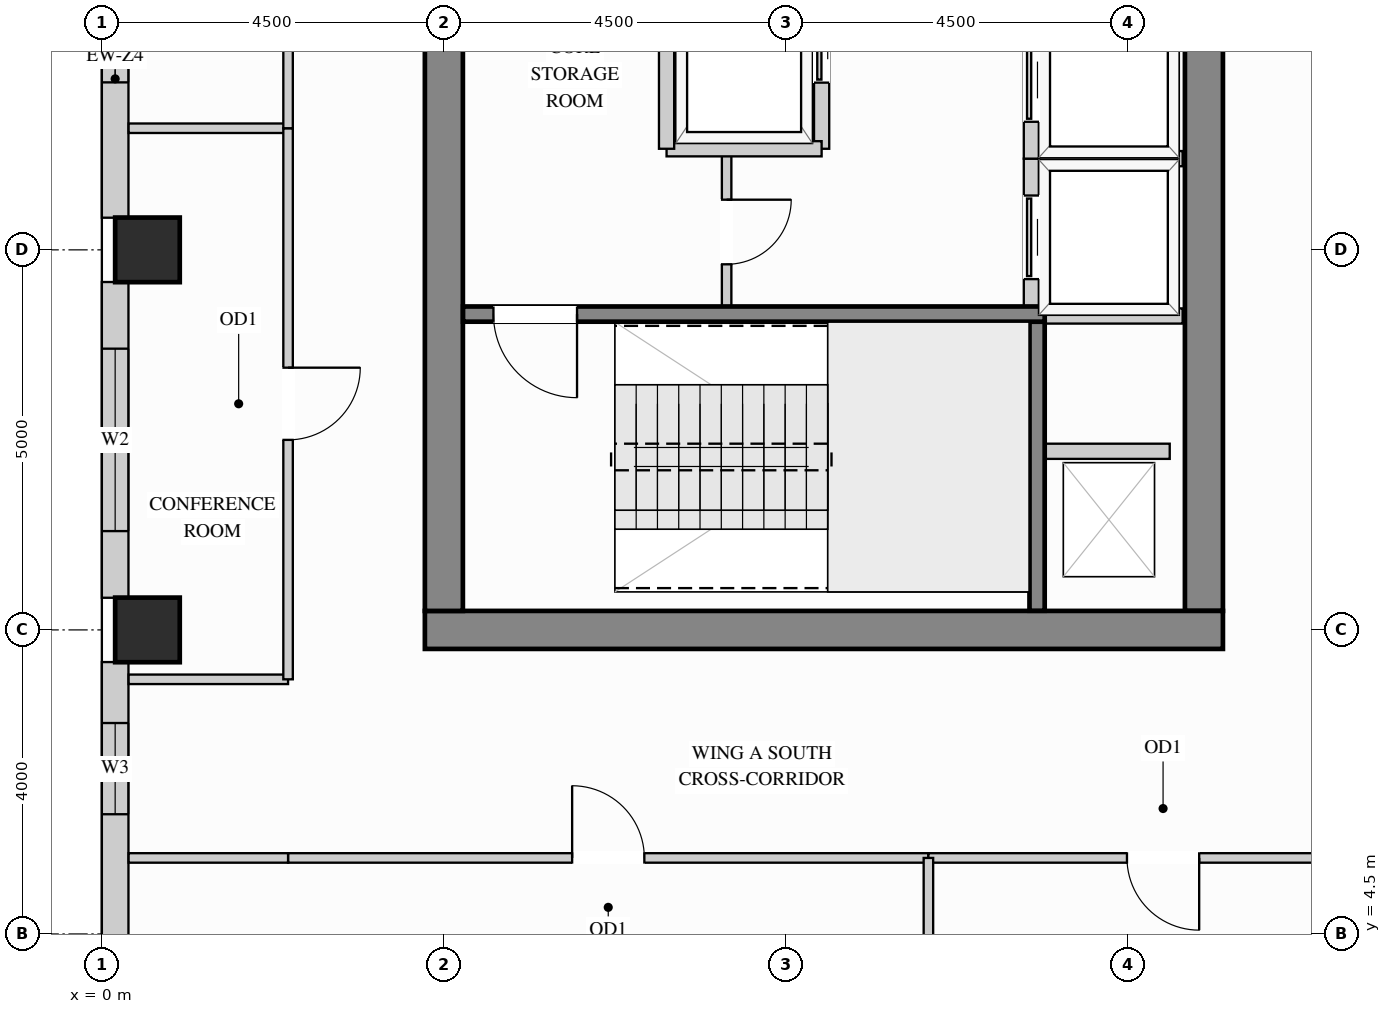
"""IFC4 building model, lengths in metres.
Left out: names, types, materials, properties, quantities, classifications, styles, units other than length and angle.
Written with IfcOpenShell. Run it as: python <this file> out.ifc"""

import sys

from ifc_helpers import new_model, si_unit, direction, frame, frame_2d, origin, origin_2d, place, context, subcontext, project, spatial, rectangle, extrude, source, transform, mapped, element, fill, save


model = new_model("IFC4")
c1 = context("Model", 3, precision=1e-05, world=origin(), true_north=direction((0.0, 1.0)))
c2 = subcontext(c1, "Body", "Model", "MODEL_VIEW")
j1 = project(units=[si_unit("LENGTHUNIT", "METRE"), si_unit("PLANEANGLEUNIT", "RADIAN")], contexts=[c1])
p1 = place(None, origin())
s1 = spatial("IfcSite", under=j1, at=p1, CompositionType="ELEMENT")
p2 = place(p1, origin())
s2 = spatial("IfcBuilding", under=s1, at=p2, CompositionType="ELEMENT")
p3 = place(p2, frame((0.0, 0.0, 216.0)))
s3 = spatial("IfcBuildingStorey", under=s2, at=p3, CompositionType="ELEMENT", Elevation=216.0)
m1 = source(origin(), c2, "Body", "SweptSolid", [
    extrude(rectangle(XDim=0.85, YDim=0.85, at=origin_2d()), origin(), (0.0, 0.0, 1.0), 3.4),
])
for number, where, z_axis, x_axis in (
    (1, (0.6, 13.5, 0.0), (0.0, 0.0, 1.0), (1.0, 0.0, 0.0)),
    (2, (0.6, 8.5, 0.0), (0.0, 0.0, 1.0), (1.0, 0.0, 0.0)),
):
    element("IfcColumn", number, at=place(p3, frame(where, z_axis=z_axis, x_axis=x_axis)), inside=s3, PredefinedType="COLUMN", context=c2, shape_type="MappedRepresentation", body=[
        mapped(m1, transform((0.0, 0.0, 0.0), x_axis=(1.0, 0.0, 0.0), y_axis=(0.0, 1.0, 0.0), z_axis=(0.0, 0.0, 1.0))),
    ])
m2 = source(origin(), c2, "Body", "SweptSolid", [
    extrude(rectangle(XDim=10.07, YDim=0.5, at=frame_2d((5.035, 0.0))), origin(), (0.0, 0.0, 1.0), 3.4),
])
p4 = place(p3, frame((14.5, 8.75, 0.0), z_axis=(0.0, 0.0, 1.0), x_axis=(0.0, 1.0, 0.0)))
e3 = element("IfcWall", 3, at=p4, inside=s3, PredefinedType="SHEAR", context=c2, shape_type="MappedRepresentation", body=[
    mapped(m2, transform((0.0, 0.0, 0.0), x_axis=(1.0, 0.0, 0.0), y_axis=(0.0, 1.0, 0.0), z_axis=(0.0, 0.0, 1.0))),
])
m3 = source(origin(), c2, "Body", "SweptSolid", [
    extrude(rectangle(XDim=10.5, YDim=0.5, at=frame_2d((5.25, 0.0))), origin(), (0.0, 0.0, 1.0), 3.4),
])
p5 = place(p3, frame((4.25, 8.5, 0.0), z_axis=(0.0, 0.0, 1.0), x_axis=(1.0, 0.0, 0.0)))
e4 = element("IfcWall", 4, at=p5, inside=s3, PredefinedType="SHEAR", context=c2, shape_type="MappedRepresentation", body=[
    mapped(m3, transform((0.0, 0.0, 0.0), x_axis=(1.0, 0.0, 0.0), y_axis=(0.0, 1.0, 0.0), z_axis=(0.0, 0.0, 1.0))),
])
m4 = source(origin(), c2, "Body", "SweptSolid", [
    extrude(rectangle(XDim=20.5, YDim=0.5, at=frame_2d((10.25, 0.0))), origin(), (0.0, 0.0, 1.0), 3.4),
])
p6 = place(p3, frame((4.5, 8.75, 0.0), z_axis=(0.0, 0.0, 1.0), x_axis=(0.0, 1.0, 0.0)))
e5 = element("IfcWall", 5, at=p6, inside=s3, PredefinedType="SHEAR", context=c2, shape_type="MappedRepresentation", body=[
    mapped(m4, transform((0.0, 0.0, 0.0), x_axis=(1.0, 0.0, 0.0), y_axis=(0.0, 1.0, 0.0), z_axis=(0.0, 0.0, 1.0))),
])
p7 = place(p3, frame((0.175, 17.577, 0.0), z_axis=(0.0, 0.0, 1.0), x_axis=(0.0, -1.0, 0.0)))
e6 = element("IfcWall", 6, at=p7, inside=s3, PredefinedType="SOLIDWALL", context=c2, shape_type="SweptSolid", body=[
    extrude(rectangle(XDim=3.654, YDim=0.35, at=frame_2d((1.827, 0.0))), origin(), (0.0, 0.0, 1.0), 3.385),
])
p8 = place(p7, frame((0.674, 0.0, 0.78)))
e7 = element("IfcOpeningElement", 7, at=p8, cuts=e6, PredefinedType="OPENING", context=c2, shape_type="SweptSolid", body=[
    extrude(rectangle(XDim=1.2, YDim=2.1, at=frame_2d((0.6, 1.05))), frame((0.0, 0.185, 0.0), z_axis=(0.0, -1.0, 0.0), x_axis=(1.0, 0.0, 0.0)), (0.0, 0.0, 1.0), 0.37),
])
p9 = place(p3, frame((0.175, 13.077, 0.0), z_axis=(0.0, 0.0, 1.0), x_axis=(0.0, -1.0, 0.0)))
e8 = element("IfcWall", 8, at=p9, inside=s3, PredefinedType="SOLIDWALL", context=c2, shape_type="SweptSolid", body=[
    extrude(rectangle(XDim=4.154, YDim=0.35, at=frame_2d((2.077, 0.0))), origin(), (0.0, 0.0, 1.0), 3.385),
])
p10 = place(p9, frame((0.877, 0.0, 0.78)))
e9 = element("IfcOpeningElement", 9, at=p10, cuts=e8, PredefinedType="OPENING", context=c2, shape_type="SweptSolid", body=[
    extrude(rectangle(XDim=2.4, YDim=2.1, at=frame_2d((1.2, 1.05))), frame((0.0, 0.185, 0.0), z_axis=(0.0, -1.0, 0.0), x_axis=(1.0, 0.0, 0.0)), (0.0, 0.0, 1.0), 0.37),
])
p11 = place(p3, frame((0.175, 8.077, 0.0), z_axis=(0.0, 0.0, 1.0), x_axis=(0.0, -1.0, 0.0)))
e10 = element("IfcWall", 10, at=p11, inside=s3, PredefinedType="SOLIDWALL", context=c2, shape_type="SweptSolid", body=[
    extrude(rectangle(XDim=4.154, YDim=0.35, at=frame_2d((2.077, 0.0))), origin(), (0.0, 0.0, 1.0), 3.385),
])
p12 = place(p11, frame((0.802, 0.0, 0.78)))
e11 = element("IfcOpeningElement", 11, at=p12, cuts=e10, PredefinedType="OPENING", context=c2, shape_type="SweptSolid", body=[
    extrude(rectangle(XDim=1.2, YDim=2.1, at=frame_2d((0.6, 1.05))), frame((0.0, 0.185, 0.0), z_axis=(0.0, -1.0, 0.0), x_axis=(1.0, 0.0, 0.0)), (0.0, 0.0, 1.0), 0.37),
])
p13 = place(p3, frame((8.22, 12.75, 0.0), z_axis=(0.0, 0.0, 1.0), x_axis=(0.0, 1.0, 0.0)))
e12 = element("IfcWall", 12, at=p13, inside=s3, PredefinedType="PARTITIONING", context=c2, shape_type="SweptSolid", body=[
    extrude(rectangle(XDim=2.07, YDim=0.125, at=frame_2d((1.035, 0.0))), origin(), (0.0, 0.0, 1.0), 3.385),
])
p14 = place(p13, frame((0.56, 0.0, 0.0)))
e13 = element("IfcOpeningElement", 13, at=p14, cuts=e12, PredefinedType="OPENING", context=c2, shape_type="SweptSolid", body=[
    extrude(rectangle(XDim=0.85, YDim=2.1, at=frame_2d((0.425, 1.05))), frame((0.0, 0.073, 0.0), z_axis=(0.0, -1.0, 0.0), x_axis=(1.0, 0.0, 0.0)), (0.0, 0.0, 1.0), 0.145),
])
m5 = source(origin(), c2, "Body", "SweptSolid", [
    extrude(rectangle(XDim=2.098, YDim=0.125, at=frame_2d((1.049, 0.0))), origin(), (0.0, 0.0, 1.0), 3.385),
])
p15 = place(p3, frame((0.352, 7.85, 0.0), z_axis=(0.0, 0.0, 1.0), x_axis=(1.0, 0.0, 0.0)))
e14 = element("IfcWall", 14, at=p15, inside=s3, PredefinedType="PARTITIONING", context=c2, shape_type="MappedRepresentation", body=[
    mapped(m5, transform((0.0, 0.0, 0.0), x_axis=(1.0, 0.0, 0.0), y_axis=(0.0, 1.0, 0.0), z_axis=(0.0, 0.0, 1.0))),
])
p16 = place(p3, frame((2.45, 5.5, 0.0), z_axis=(0.0, 0.0, 1.0), x_axis=(1.0, 0.0, 0.0)))
e15 = element("IfcWall", 15, at=p16, inside=s3, PredefinedType="PARTITIONING", context=c2, shape_type="SweptSolid", body=[
    extrude(rectangle(XDim=8.425, YDim=0.125, at=frame_2d((4.212, 0.0))), origin(), (0.0, 0.0, 1.0), 3.385),
])
p17 = place(p16, frame((3.738, 0.0, 0.0)))
e16 = element("IfcOpeningElement", 16, at=p17, cuts=e15, PredefinedType="OPENING", context=c2, shape_type="SweptSolid", body=[
    extrude(rectangle(XDim=0.95, YDim=2.15, at=frame_2d((0.475, 1.075))), frame((0.0, 0.073, 0.0), z_axis=(0.0, -1.0, 0.0), x_axis=(1.0, 0.0, 0.0)), (0.0, 0.0, 1.0), 0.145),
])
p18 = place(p3, frame((10.875, 5.5, 0.0), z_axis=(0.0, 0.0, 1.0), x_axis=(1.0, 0.0, 0.0)))
e17 = element("IfcWall", 17, at=p18, inside=s3, PredefinedType="PARTITIONING", context=c2, shape_type="SweptSolid", body=[
    extrude(rectangle(XDim=6.175, YDim=0.125, at=frame_2d((3.087, 0.0))), origin(), (0.0, 0.0, 1.0), 3.385),
])
p19 = place(p18, frame((2.613, 0.0, 0.0)))
e18 = element("IfcOpeningElement", 18, at=p19, cuts=e17, PredefinedType="OPENING", context=c2, shape_type="SweptSolid", body=[
    extrude(rectangle(XDim=0.95, YDim=2.15, at=frame_2d((0.475, 1.075))), frame((0.0, 0.073, 0.0), z_axis=(0.0, -1.0, 0.0), x_axis=(1.0, 0.0, 0.0)), (0.0, 0.0, 1.0), 0.145),
])
p20 = place(p3, frame((0.352, 5.5, 0.0), z_axis=(0.0, 0.0, 1.0), x_axis=(1.0, 0.0, 0.0)))
e19 = element("IfcWall", 19, at=p20, inside=s3, PredefinedType="PARTITIONING", context=c2, shape_type="MappedRepresentation", body=[
    mapped(m5, transform((0.0, 0.0, 0.0), x_axis=(1.0, 0.0, 0.0), y_axis=(0.0, 1.0, 0.0), z_axis=(0.0, 0.0, 1.0))),
])
m6 = source(origin(), c2, "Body", "SweptSolid", [
    extrude(rectangle(XDim=5.148, YDim=0.125, at=frame_2d((2.574, 0.0))), origin(), (0.0, 0.0, 1.0), 3.385),
])
p21 = place(p3, frame((10.875, 0.352, 0.0), z_axis=(0.0, 0.0, 1.0), x_axis=(0.0, 1.0, 0.0)))
e20 = element("IfcWall", 20, at=p21, inside=s3, PredefinedType="PARTITIONING", context=c2, shape_type="MappedRepresentation", body=[
    mapped(m6, transform((0.0, 0.0, 0.0), x_axis=(1.0, 0.0, 0.0), y_axis=(0.0, 1.0, 0.0), z_axis=(0.0, 0.0, 1.0))),
])
p22 = place(p3, frame((0.352, 15.1, 0.0), z_axis=(0.0, 0.0, 1.0), x_axis=(1.0, 0.0, 0.0)))
e21 = element("IfcWall", 21, at=p22, inside=s3, PredefinedType="PARTITIONING", context=c2, shape_type="MappedRepresentation", body=[
    mapped(m5, transform((0.0, 0.0, 0.0), x_axis=(1.0, 0.0, 0.0), y_axis=(0.0, 1.0, 0.0), z_axis=(0.0, 0.0, 1.0))),
])
p23 = place(p3, frame((2.45, 7.85, 0.0), z_axis=(0.0, 0.0, 1.0), x_axis=(0.0, 1.0, 0.0)))
e22 = element("IfcWall", 22, at=p23, inside=s3, PredefinedType="PARTITIONING", context=c2, shape_type="SweptSolid", body=[
    extrude(rectangle(XDim=7.25, YDim=0.125, at=frame_2d((3.625, 0.0))), origin(), (0.0, 0.0, 1.0), 3.385),
])
p24 = place(p23, frame((3.15, 0.0, 0.0)))
e23 = element("IfcOpeningElement", 23, at=p24, cuts=e22, PredefinedType="OPENING", context=c2, shape_type="SweptSolid", body=[
    extrude(rectangle(XDim=0.95, YDim=2.15, at=frame_2d((0.475, 1.075))), frame((0.0, 0.073, 0.0), z_axis=(0.0, -1.0, 0.0), x_axis=(1.0, 0.0, 0.0)), (0.0, 0.0, 1.0), 0.145),
])
p25 = place(p3, frame((2.45, 15.1, 0.0), z_axis=(0.0, 0.0, 1.0), x_axis=(0.0, 1.0, 0.0)))
e24 = element("IfcWall", 24, at=p25, inside=s3, PredefinedType="PARTITIONING", context=c2, shape_type="SweptSolid", body=[
    extrude(rectangle(XDim=7.5, YDim=0.125, at=frame_2d((3.75, 0.0))), origin(), (0.0, 0.0, 1.0), 3.385),
])
p26 = place(p25, frame((3.275, 0.0, 0.0)))
e25 = element("IfcOpeningElement", 25, at=p26, cuts=e24, PredefinedType="OPENING", context=c2, shape_type="SweptSolid", body=[
    extrude(rectangle(XDim=0.95, YDim=2.15, at=frame_2d((0.475, 1.075))), frame((0.0, 0.073, 0.0), z_axis=(0.0, -1.0, 0.0), x_axis=(1.0, 0.0, 0.0)), (0.0, 0.0, 1.0), 0.145),
])
m7 = source(origin(), c2, "Body", "SweptSolid", [
    extrude(rectangle(XDim=1.63, YDim=0.2, at=frame_2d((0.815, 0.0))), origin(), (0.0, 0.0, 1.0), 3.385),
])
p27 = place(p3, frame((12.42, 10.85, 0.0), z_axis=(0.0, 0.0, 1.0), x_axis=(1.0, 0.0, 0.0)))
e26 = element("IfcWall", 26, at=p27, inside=s3, PredefinedType="PARTITIONING", context=c2, shape_type="MappedRepresentation", body=[
    mapped(m7, transform((0.0, 0.0, 0.0), x_axis=(1.0, 0.0, 0.0), y_axis=(0.0, 1.0, 0.0), z_axis=(0.0, 0.0, 1.0))),
])
m8 = source(origin(), c2, "Body", "SweptSolid", [
    extrude(rectangle(XDim=1.99, YDim=0.2, at=frame_2d((0.995, 0.0))), origin(), (0.0, 0.0, 1.0), 3.385),
])
for number, where, z_axis, x_axis in (
    (27, (12.23, 14.7, 0.0), (0.0, 0.0, 1.0), (1.0, 0.0, 0.0)),
    (28, (12.23, 12.63, 0.0), (0.0, 0.0, 1.0), (1.0, 0.0, 0.0)),
):
    element("IfcWall", number, at=place(p3, frame(where, z_axis=z_axis, x_axis=x_axis)), inside=s3, PredefinedType="PARTITIONING", context=c2, shape_type="MappedRepresentation", body=[
        mapped(m8, transform((0.0, 0.0, 0.0), x_axis=(1.0, 0.0, 0.0), y_axis=(0.0, 1.0, 0.0), z_axis=(0.0, 0.0, 1.0))),
    ])
p28 = place(p3, frame((12.23, 12.63, 0.0), z_axis=(0.0, 0.0, 1.0), x_axis=(0.0, 1.0, 0.0)))
e29 = element("IfcWall", 29, at=p28, inside=s3, PredefinedType="PARTITIONING", context=c2, shape_type="SweptSolid", body=[
    extrude(rectangle(XDim=2.07, YDim=0.2, at=frame_2d((1.035, 0.0))), origin(), (0.0, 0.0, 1.0), 3.385),
])
p29 = place(p28, frame((0.485, 0.0, 0.0)))
e30 = element("IfcOpeningElement", 30, at=p29, cuts=e29, PredefinedType="OPENING", context=c2, shape_type="SweptSolid", body=[
    extrude(rectangle(XDim=1.1, YDim=2.2, at=frame_2d((0.55, 1.1))), frame((0.0, 0.11, 0.0), z_axis=(0.0, -1.0, 0.0), x_axis=(1.0, 0.0, 0.0)), (0.0, 0.0, 1.0), 0.22),
])
p30 = place(p3, frame((12.23, 14.7, 0.0), z_axis=(0.0, 0.0, 1.0), x_axis=(0.0, 1.0, 0.0)))
e31 = element("IfcWall", 31, at=p30, inside=s3, PredefinedType="PARTITIONING", context=c2, shape_type="SweptSolid", body=[
    extrude(rectangle(XDim=2.07, YDim=0.2, at=frame_2d((1.035, 0.0))), origin(), (0.0, 0.0, 1.0), 3.385),
])
p31 = place(p30, frame((0.485, 0.0, 0.0)))
e32 = element("IfcOpeningElement", 32, at=p31, cuts=e31, PredefinedType="OPENING", context=c2, shape_type="SweptSolid", body=[
    extrude(rectangle(XDim=1.1, YDim=2.2, at=frame_2d((0.55, 1.1))), frame((0.0, 0.11, 0.0), z_axis=(0.0, -1.0, 0.0), x_axis=(1.0, 0.0, 0.0)), (0.0, 0.0, 1.0), 0.22),
])
p32 = place(p3, frame((9.47, 14.83, 0.0), z_axis=(0.0, 0.0, 1.0), x_axis=(0.0, 1.0, 0.0)))
e33 = element("IfcWall", 33, at=p32, inside=s3, PredefinedType="PARTITIONING", context=c2, shape_type="SweptSolid", body=[
    extrude(rectangle(XDim=2.84, YDim=0.2, at=frame_2d((1.42, 0.0))), origin(), (0.0, 0.0, 1.0), 3.385),
])
p33 = place(p32, frame((0.87, 0.0, 0.0)))
e34 = element("IfcOpeningElement", 34, at=p33, cuts=e33, PredefinedType="OPENING", context=c2, shape_type="SweptSolid", body=[
    extrude(rectangle(XDim=1.1, YDim=2.2, at=frame_2d((0.55, 1.1))), frame((0.0, 0.11, 0.0), z_axis=(0.0, -1.0, 0.0), x_axis=(1.0, 0.0, 0.0)), (0.0, 0.0, 1.0), 0.22),
])
m9 = source(origin(), c2, "Body", "SweptSolid", [
    extrude(rectangle(XDim=2.04, YDim=0.2, at=frame_2d((1.02, 0.0))), origin(), (0.0, 0.0, 1.0), 3.385),
])
p34 = place(p3, frame((7.43, 14.83, 0.0), z_axis=(0.0, 0.0, 1.0), x_axis=(1.0, 0.0, 0.0)))
e35 = element("IfcWall", 35, at=p34, inside=s3, PredefinedType="PARTITIONING", context=c2, shape_type="MappedRepresentation", body=[
    mapped(m9, transform((0.0, 0.0, 0.0), x_axis=(1.0, 0.0, 0.0), y_axis=(0.0, 1.0, 0.0), z_axis=(0.0, 0.0, 1.0))),
])
m10 = source(origin(), c2, "Body", "SweptSolid", [
    extrude(rectangle(XDim=2.84, YDim=0.2, at=frame_2d((1.42, 0.0))), origin(), (0.0, 0.0, 1.0), 3.385),
])
p35 = place(p3, frame((7.43, 14.83, 0.0), z_axis=(0.0, 0.0, 1.0), x_axis=(0.0, 1.0, 0.0)))
e36 = element("IfcWall", 36, at=p35, inside=s3, PredefinedType="PARTITIONING", context=c2, shape_type="MappedRepresentation", body=[
    mapped(m10, transform((0.0, 0.0, 0.0), x_axis=(1.0, 0.0, 0.0), y_axis=(0.0, 1.0, 0.0), z_axis=(0.0, 0.0, 1.0))),
])
m11 = source(origin(), c2, "Body", "SweptSolid", [
    extrude(rectangle(XDim=3.803, YDim=0.2, at=frame_2d((1.901, 0.0))), origin(), (0.0, 0.0, 1.0), 3.4),
])
p36 = place(p3, frame((12.305, 8.752, 0.0), z_axis=(0.0, 0.0, 1.0), x_axis=(0.0, 1.0, 0.0)))
e37 = element("IfcWall", 37, at=p36, inside=s3, PredefinedType="SHEAR", context=c2, shape_type="MappedRepresentation", body=[
    mapped(m11, transform((0.0, 0.0, 0.0), x_axis=(1.0, 0.0, 0.0), y_axis=(0.0, 1.0, 0.0), z_axis=(0.0, 0.0, 1.0))),
])
p37 = place(p3, frame((4.752, 12.655, 0.0), z_axis=(0.0, 0.0, 1.0), x_axis=(1.0, 0.0, 0.0)))
e38 = element("IfcWall", 38, at=p37, inside=s3, PredefinedType="SHEAR", context=c2, shape_type="SweptSolid", body=[
    extrude(rectangle(XDim=7.653, YDim=0.2, at=frame_2d((3.827, 0.0))), origin(), (0.0, 0.0, 1.0), 3.4),
])
p38 = place(p37, frame((0.4, 0.0, 0.0)))
e39 = element("IfcOpeningElement", 39, at=p38, cuts=e38, PredefinedType="OPENING", context=c2, shape_type="SweptSolid", body=[
    extrude(rectangle(XDim=1.1, YDim=2.15, at=frame_2d((0.55, 1.075))), frame((0.0, 0.11, 0.0), z_axis=(0.0, -1.0, 0.0), x_axis=(1.0, 0.0, 0.0)), (0.0, 0.0, 1.0), 0.22),
])
m12 = source(origin(), c2, "Body", "SweptSolid", [
    extrude(rectangle(XDim=1.1, YDim=2.2, at=frame_2d((0.55, 1.1))), frame((0.0, 0.025, 0.0), z_axis=(0.0, -1.0, 0.0), x_axis=(1.0, 0.0, 0.0)), (0.0, 0.0, 1.0), 0.05),
])
p39 = place(p29, origin())
e40 = element("IfcDoor", 40, at=p39, inside=s3, OperationType="SLIDING_TO_LEFT", PredefinedType="DOOR", context=c2, shape_type="MappedRepresentation", body=[
    mapped(m12, transform((0.0, 0.0, 0.0), x_axis=(1.0, 0.0, 0.0), y_axis=(0.0, 1.0, 0.0), z_axis=(0.0, 0.0, 1.0))),
])
fill(e30, e40)
p40 = place(p31, origin())
e41 = element("IfcDoor", 41, at=p40, inside=s3, OperationType="SLIDING_TO_LEFT", PredefinedType="DOOR", context=c2, shape_type="MappedRepresentation", body=[
    mapped(m12, transform((0.0, 0.0, 0.0), x_axis=(1.0, 0.0, 0.0), y_axis=(0.0, 1.0, 0.0), z_axis=(0.0, 0.0, 1.0))),
])
fill(e32, e41)
p41 = place(p33, origin())
e42 = element("IfcDoor", 42, at=p41, inside=s3, OperationType="SLIDING_TO_LEFT", PredefinedType="DOOR", context=c2, shape_type="MappedRepresentation", body=[
    mapped(m12, transform((0.0, 0.0, 0.0), x_axis=(1.0, 0.0, 0.0), y_axis=(0.0, 1.0, 0.0), z_axis=(0.0, 0.0, 1.0))),
])
fill(e34, e42)
m13 = source(origin(), c2, "Body", "SweptSolid", [
    extrude(rectangle(XDim=0.95, YDim=2.15, at=frame_2d((0.475, 1.075))), frame((0.0, 0.025, 0.0), z_axis=(0.0, -1.0, 0.0), x_axis=(1.0, 0.0, 0.0)), (0.0, 0.0, 1.0), 0.05),
])
p42 = place(p17, origin())
e43 = element("IfcDoor", 43, at=p42, inside=s3, OperationType="SINGLE_SWING_LEFT", PredefinedType="DOOR", context=c2, shape_type="MappedRepresentation", body=[
    mapped(m13, transform((0.0, 0.0, 0.0), x_axis=(1.0, 0.0, 0.0), y_axis=(0.0, 1.0, 0.0), z_axis=(0.0, 0.0, 1.0))),
])
fill(e16, e43)
p43 = place(p19, origin())
e44 = element("IfcDoor", 44, at=p43, inside=s3, OperationType="SINGLE_SWING_RIGHT", PredefinedType="DOOR", context=c2, shape_type="MappedRepresentation", body=[
    mapped(m13, transform((0.0, 0.0, 0.0), x_axis=(1.0, 0.0, 0.0), y_axis=(0.0, 1.0, 0.0), z_axis=(0.0, 0.0, 1.0))),
])
fill(e18, e44)
p44 = place(p24, origin())
e45 = element("IfcDoor", 45, at=p44, inside=s3, OperationType="SINGLE_SWING_RIGHT", PredefinedType="DOOR", context=c2, shape_type="MappedRepresentation", body=[
    mapped(m13, transform((0.0, 0.0, 0.0), x_axis=(1.0, 0.0, 0.0), y_axis=(0.0, 1.0, 0.0), z_axis=(0.0, 0.0, 1.0))),
])
fill(e23, e45)
m14 = source(origin(), c2, "Body", "SweptSolid", [
    extrude(rectangle(XDim=0.85, YDim=2.1, at=frame_2d((0.425, 1.05))), frame((0.0, 0.025, 0.0), z_axis=(0.0, -1.0, 0.0), x_axis=(1.0, 0.0, 0.0)), (0.0, 0.0, 1.0), 0.05),
])
p45 = place(p14, origin())
e46 = element("IfcDoor", 46, at=p45, inside=s3, OperationType="SINGLE_SWING_RIGHT", PredefinedType="DOOR", context=c2, shape_type="MappedRepresentation", body=[
    mapped(m14, transform((0.0, 0.0, 0.0), x_axis=(1.0, 0.0, 0.0), y_axis=(0.0, 1.0, 0.0), z_axis=(0.0, 0.0, 1.0))),
])
fill(e13, e46)
m15 = source(origin(), c2, "Body", "SweptSolid", [
    extrude(rectangle(XDim=1.1, YDim=2.15, at=frame_2d((0.55, 1.075))), frame((0.0, 0.025, 0.0), z_axis=(0.0, -1.0, 0.0), x_axis=(1.0, 0.0, 0.0)), (0.0, 0.0, 1.0), 0.05),
])
p46 = place(p38, origin())
e47 = element("IfcDoor", 47, at=p46, inside=s3, OperationType="SINGLE_SWING_RIGHT", PredefinedType="DOOR", context=c2, shape_type="MappedRepresentation", body=[
    mapped(m15, transform((0.0, 0.0, 0.0), x_axis=(1.0, 0.0, 0.0), y_axis=(0.0, 1.0, 0.0), z_axis=(0.0, 0.0, 1.0))),
])
fill(e39, e47)
m16 = source(origin(), c2, "Body", "SweptSolid", [
    extrude(rectangle(XDim=2.4, YDim=2.1, at=frame_2d((1.2, 1.05))), frame((0.0, 0.03, 0.0), z_axis=(0.0, -1.0, 0.0), x_axis=(1.0, 0.0, 0.0)), (0.0, 0.0, 1.0), 0.06),
])
p47 = place(p10, origin())
e48 = element("IfcWindow", 48, at=p47, inside=s3, PartitioningType="SINGLE_PANEL", PredefinedType="WINDOW", context=c2, shape_type="MappedRepresentation", body=[
    mapped(m16, transform((0.0, 0.0, 0.0), x_axis=(1.0, 0.0, 0.0), y_axis=(0.0, 1.0, 0.0), z_axis=(0.0, 0.0, 1.0))),
])
fill(e9, e48)
m17 = source(origin(), c2, "Body", "SweptSolid", [
    extrude(rectangle(XDim=1.2, YDim=2.1, at=frame_2d((0.6, 1.05))), frame((0.0, 0.03, 0.0), z_axis=(0.0, -1.0, 0.0), x_axis=(1.0, 0.0, 0.0)), (0.0, 0.0, 1.0), 0.06),
])
p48 = place(p8, origin())
e49 = element("IfcWindow", 49, at=p48, inside=s3, PartitioningType="SINGLE_PANEL", PredefinedType="WINDOW", context=c2, shape_type="MappedRepresentation", body=[
    mapped(m17, transform((0.0, 0.0, 0.0), x_axis=(1.0, 0.0, 0.0), y_axis=(0.0, 1.0, 0.0), z_axis=(0.0, 0.0, 1.0))),
])
fill(e7, e49)
p49 = place(p12, origin())
e50 = element("IfcWindow", 50, at=p49, inside=s3, PartitioningType="SINGLE_PANEL", PredefinedType="WINDOW", context=c2, shape_type="MappedRepresentation", body=[
    mapped(m17, transform((0.0, 0.0, 0.0), x_axis=(1.0, 0.0, 0.0), y_axis=(0.0, 1.0, 0.0), z_axis=(0.0, 0.0, 1.0))),
])
fill(e11, e50)
save(model, sys.argv[1])
